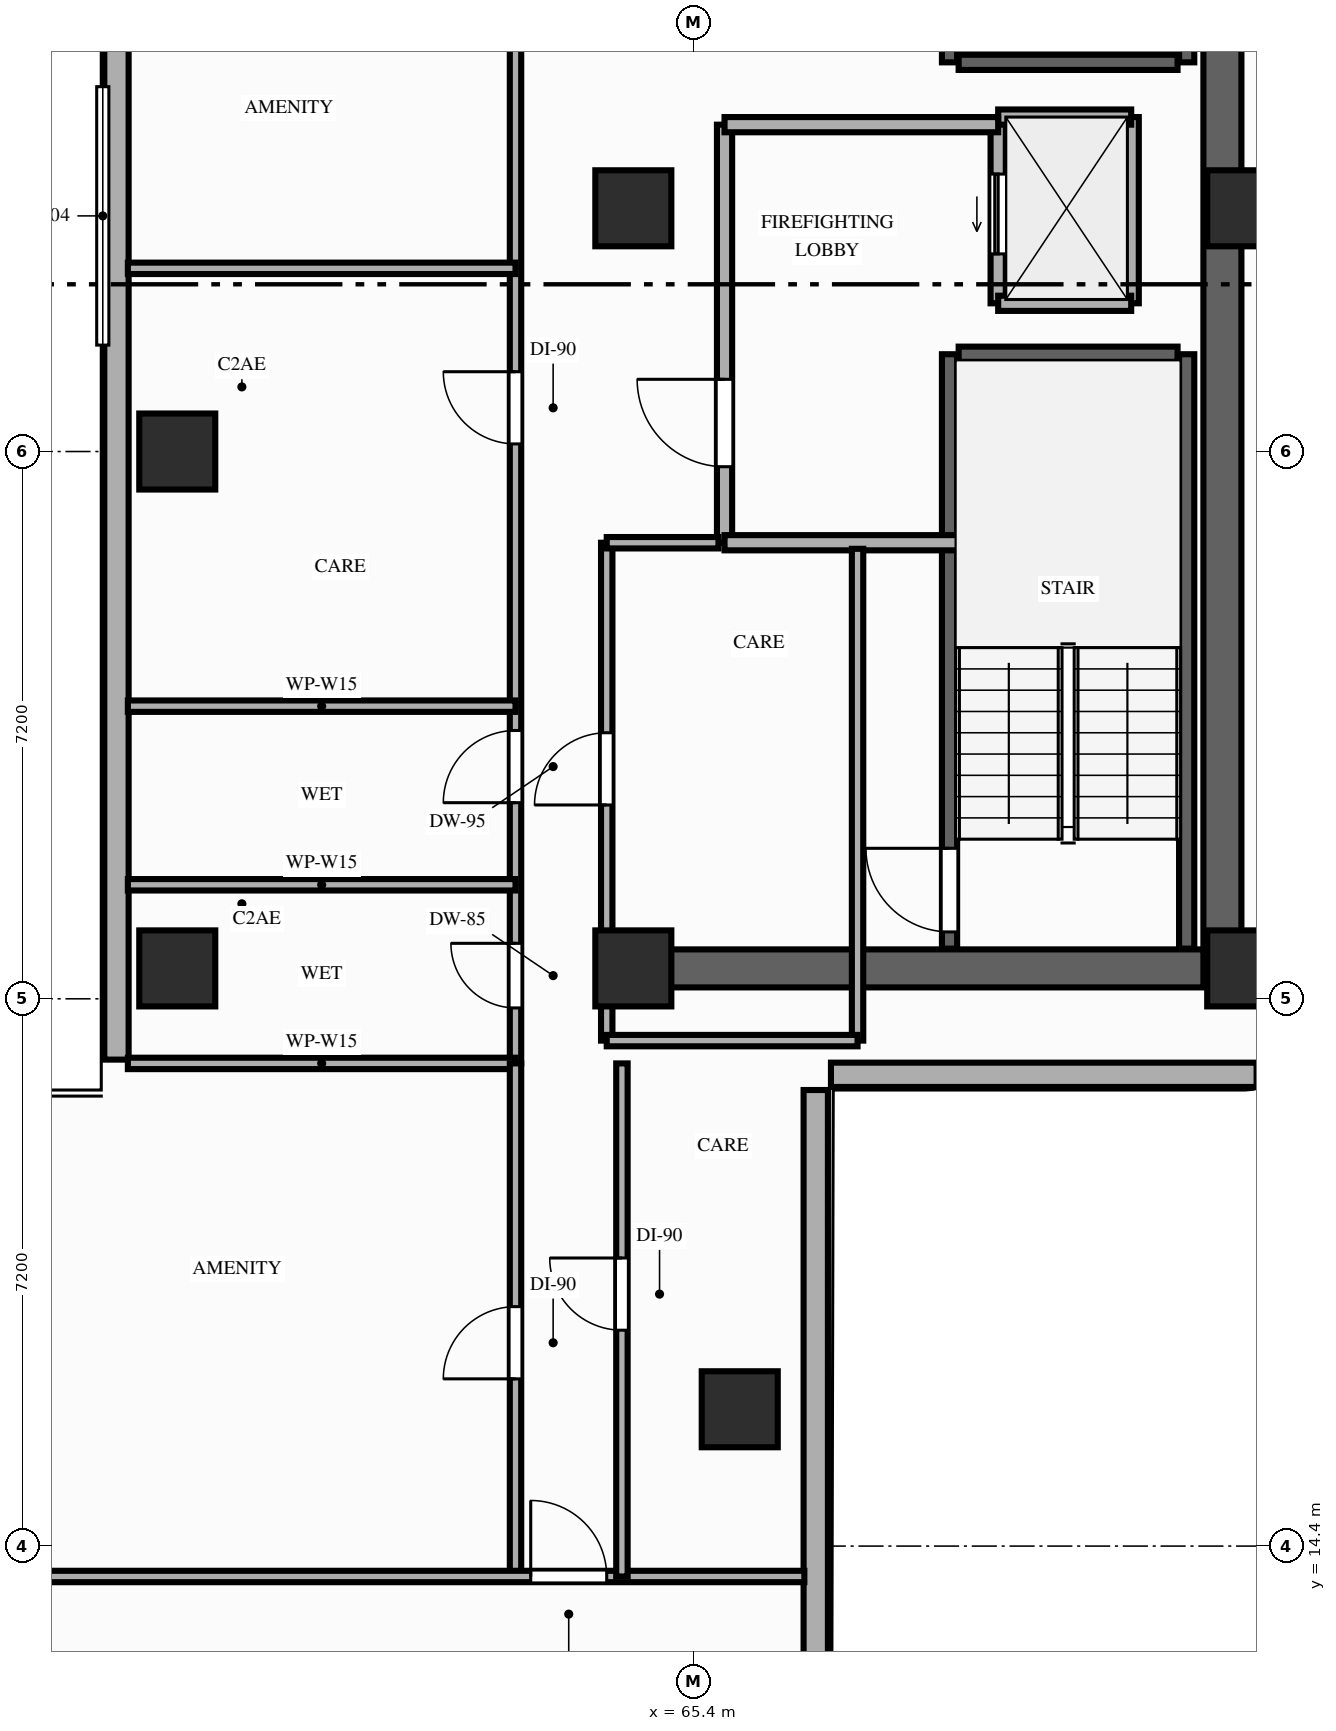
"""IFC4 building model, lengths in metres.
Left out: names, types, materials, properties, quantities, classifications, styles, units other than length and angle.
Written with IfcOpenShell. Run it as: python <this file> out.ifc"""

import sys

from ifc_helpers import new_model, si_unit, direction, frame, frame_2d, origin, origin_2d, place, context, subcontext, project, spatial, rectangle, extrude, element, fill, save


model = new_model("IFC4")
c1 = context("Model", 3, precision=1e-05, world=origin(), true_north=direction((0.0, 1.0)))
c2 = subcontext(c1, "Body", "Model", "MODEL_VIEW")
j1 = project(units=[si_unit("LENGTHUNIT", "METRE"), si_unit("PLANEANGLEUNIT", "RADIAN")], contexts=[c1])
p1 = place(None, origin())
s1 = spatial("IfcSite", under=j1, at=p1, CompositionType="ELEMENT")
p2 = place(p1, origin())
s2 = spatial("IfcBuilding", under=s1, at=p2, CompositionType="ELEMENT")
p3 = place(p2, frame((0.0, 0.0, 33.4)))
s3 = spatial("IfcBuildingStorey", under=s2, at=p3, CompositionType="ELEMENT", Elevation=33.4)
for number, where, z_axis, x_axis in (
    (1, (64.6, 22.0, 0.0), (0.0, 0.0, 1.0), (1.0, 0.0, 0.0)),
    (2, (72.65, 22.0, 0.0), (0.0, 0.0, 1.0), (1.0, 0.0, 0.0)),
    (3, (64.6, 32.0, 0.0), (0.0, 0.0, 1.0), (1.0, 0.0, 0.0)),
    (4, (72.65, 32.0, 0.0), (0.0, 0.0, 1.0), (1.0, 0.0, 0.0)),
    (5, (58.6, 22.0, 0.0), (0.0, 0.0, 1.0), (1.0, 0.0, 0.0)),
    (6, (58.6, 28.8, 0.0), (0.0, 0.0, 1.0), (1.0, 0.0, 0.0)),
    (7, (66.0, 16.2, 0.0), (0.0, 0.0, 1.0), (1.0, 0.0, 0.0)),
):
    element("IfcColumn", number, at=place(p3, frame(where, z_axis=z_axis, x_axis=x_axis)), inside=s3, PredefinedType="COLUMN", context=c2, shape_type="SweptSolid", body=[
        extrude(rectangle(XDim=1.0, YDim=1.0, at=origin_2d()), origin(), (0.0, 0.0, 1.0), 3.2),
    ])
p4 = place(p3, frame((57.8, 43.4, 0.0), z_axis=(0.0, 0.0, 1.0), x_axis=(0.0, -1.0, 0.0)))
e8 = element("IfcWall", 8, at=p4, inside=s3, PredefinedType="STANDARD", context=c2, shape_type="SweptSolid", body=[
    extrude(rectangle(XDim=22.6, YDim=0.32, at=frame_2d((11.3, 0.0))), origin(), (0.0, 0.0, 1.0), 2.51),
])
p5 = place(p3, frame((67.0, 7.6, 0.0), z_axis=(0.0, 0.0, 1.0), x_axis=(0.0, 1.0, 0.0)))
e9 = element("IfcWall", 9, at=p5, inside=s3, PredefinedType="STANDARD", context=c2, shape_type="SweptSolid", body=[
    extrude(rectangle(XDim=12.8, YDim=0.32, at=frame_2d((6.4, 0.0))), origin(), (0.0, 0.0, 1.0), 3.02),
])
p6 = place(p3, frame((67.2, 20.6, 0.0), z_axis=(0.0, 0.0, 1.0), x_axis=(1.0, 0.0, 0.0)))
e10 = element("IfcWall", 10, at=p6, inside=s3, PredefinedType="STANDARD", context=c2, shape_type="SweptSolid", body=[
    extrude(rectangle(XDim=5.6, YDim=0.32, at=frame_2d((2.8, 0.0))), origin(), (0.0, 0.0, 1.0), 3.02),
])
p7 = place(p3, frame((72.35, 22.0, 0.0), z_axis=(0.0, 0.0, 1.0), x_axis=(0.0, 1.0, 0.0)))
e11 = element("IfcWall", 11, at=p7, inside=s3, PredefinedType="SHEAR", context=c2, shape_type="SweptSolid", body=[
    extrude(rectangle(XDim=20.25, YDim=0.5, at=frame_2d((10.125, 0.0))), origin(), (0.0, 0.0, 1.0), 3.02),
])
p8 = place(p3, frame((64.6, 22.0, 0.0), z_axis=(0.0, 0.0, 1.0), x_axis=(1.0, 0.0, 0.0)))
e12 = element("IfcWall", 12, at=p8, inside=s3, PredefinedType="SHEAR", context=c2, shape_type="SweptSolid", body=[
    extrude(rectangle(XDim=7.5, YDim=0.5, at=frame_2d((3.75, 0.0))), origin(), (0.0, 0.0, 1.0), 3.02),
])
p9 = place(p3, frame((68.76, 22.26, 0.0), z_axis=(0.0, 0.0, 1.0), x_axis=(0.0, 1.0, 0.0)))
e13 = element("IfcWall", 13, at=p9, inside=s3, PredefinedType="SHEAR", context=c2, shape_type="SweptSolid", body=[
    extrude(rectangle(XDim=7.82, YDim=0.2, at=frame_2d((3.91, 0.0))), origin(), (0.0, 0.0, 1.0), 3.02),
])
p10 = place(p9, frame((0.22, 0.0, 0.0)))
e14 = element("IfcOpeningElement", 14, at=p10, cuts=e13, PredefinedType="OPENING", context=c2, shape_type="SweptSolid", body=[
    extrude(rectangle(XDim=1.1, YDim=2.15, at=frame_2d((0.55, 1.075))), frame((0.0, 0.11, 0.0), z_axis=(0.0, -1.0, 0.0), x_axis=(1.0, 0.0, 0.0)), (0.0, 0.0, 1.0), 0.22),
])
p11 = place(p3, frame((71.88, 22.26, 0.0), z_axis=(0.0, 0.0, 1.0), x_axis=(0.0, 1.0, 0.0)))
e15 = element("IfcWall", 15, at=p11, inside=s3, PredefinedType="SHEAR", context=c2, shape_type="SweptSolid", body=[
    extrude(rectangle(XDim=7.82, YDim=0.2, at=frame_2d((3.91, 0.0))), origin(), (0.0, 0.0, 1.0), 3.02),
])
p12 = place(p3, frame((68.88, 30.08, 0.0), z_axis=(0.0, 0.0, 1.0), x_axis=(1.0, 0.0, 0.0)))
e16 = element("IfcWall", 16, at=p12, inside=s3, PredefinedType="SHEAR", context=c2, shape_type="SweptSolid", body=[
    extrude(rectangle(XDim=2.88, YDim=0.2, at=frame_2d((1.44, 0.0))), origin(), (0.0, 0.0, 1.0), 3.02),
])
p13 = place(p3, frame((68.76, 33.92, 0.0), z_axis=(0.0, 0.0, 1.0), x_axis=(0.0, 1.0, 0.0)))
e17 = element("IfcWall", 17, at=p13, inside=s3, PredefinedType="SHEAR", context=c2, shape_type="SweptSolid", body=[
    extrude(rectangle(XDim=7.96, YDim=0.2, at=frame_2d((3.98, 0.0))), origin(), (0.0, 0.0, 1.0), 3.02),
])
p14 = place(p13, frame((0.22, 0.0, 0.0)))
e18 = element("IfcOpeningElement", 18, at=p14, cuts=e17, PredefinedType="OPENING", context=c2, shape_type="SweptSolid", body=[
    extrude(rectangle(XDim=1.1, YDim=2.15, at=frame_2d((0.55, 1.075))), frame((0.0, 0.11, 0.0), z_axis=(0.0, -1.0, 0.0), x_axis=(1.0, 0.0, 0.0)), (0.0, 0.0, 1.0), 0.22),
])
p15 = place(p3, frame((71.88, 33.92, 0.0), z_axis=(0.0, 0.0, 1.0), x_axis=(0.0, 1.0, 0.0)))
e19 = element("IfcWall", 19, at=p15, inside=s3, PredefinedType="SHEAR", context=c2, shape_type="SweptSolid", body=[
    extrude(rectangle(XDim=7.96, YDim=0.2, at=frame_2d((3.98, 0.0))), origin(), (0.0, 0.0, 1.0), 3.02),
])
p16 = place(p3, frame((68.88, 33.92, 0.0), z_axis=(0.0, 0.0, 1.0), x_axis=(1.0, 0.0, 0.0)))
e20 = element("IfcWall", 20, at=p16, inside=s3, PredefinedType="SHEAR", context=c2, shape_type="SweptSolid", body=[
    extrude(rectangle(XDim=2.88, YDim=0.2, at=frame_2d((1.44, 0.0))), origin(), (0.0, 0.0, 1.0), 3.02),
])
p17 = place(p3, frame((69.4, 30.75, 0.0), z_axis=(0.0, 0.0, 1.0), x_axis=(0.0, 1.0, 0.0)))
e21 = element("IfcWall", 21, at=p17, inside=s3, PredefinedType="MOVABLE", context=c2, shape_type="SweptSolid", body=[
    extrude(rectangle(XDim=2.45, YDim=0.2, at=frame_2d((1.225, 0.0))), origin(), (0.0, 0.0, 1.0), 3.02),
])
p18 = place(p17, frame((0.65, 0.0, 0.0)))
e22 = element("IfcOpeningElement", 22, at=p18, cuts=e21, PredefinedType="OPENING", context=c2, shape_type="SweptSolid", body=[
    extrude(rectangle(XDim=1.05, YDim=2.15, at=frame_2d((0.525, 1.075))), frame((0.0, 0.11, 0.0), z_axis=(0.0, -1.0, 0.0), x_axis=(1.0, 0.0, 0.0)), (0.0, 0.0, 1.0), 0.22),
])
p19 = place(p3, frame((71.15, 30.75, 0.0), z_axis=(0.0, 0.0, 1.0), x_axis=(0.0, 1.0, 0.0)))
e23 = element("IfcWall", 23, at=p19, inside=s3, PredefinedType="MOVABLE", context=c2, shape_type="SweptSolid", body=[
    extrude(rectangle(XDim=2.45, YDim=0.2, at=frame_2d((1.225, 0.0))), origin(), (0.0, 0.0, 1.0), 3.02),
])
for number, where, z_axis, x_axis in (
    (24, (69.4, 33.2, 0.0), (0.0, 0.0, 1.0), (1.0, 0.0, 0.0)),
    (25, (69.4, 30.75, 0.0), (0.0, 0.0, 1.0), (1.0, 0.0, 0.0)),
):
    element("IfcWall", number, at=place(p3, frame(where, z_axis=z_axis, x_axis=x_axis)), inside=s3, PredefinedType="MOVABLE", context=c2, shape_type="SweptSolid", body=[
        extrude(rectangle(XDim=1.75, YDim=0.2, at=frame_2d((0.875, 0.0))), origin(), (0.0, 0.0, 1.0), 3.02),
    ])
p20 = place(p3, frame((65.8, 27.6, 0.0), z_axis=(0.0, 0.0, 1.0), x_axis=(0.0, 1.0, 0.0)))
e26 = element("IfcWall", 26, at=p20, inside=s3, PredefinedType="PARTITIONING", context=c2, shape_type="SweptSolid", body=[
    extrude(rectangle(XDim=5.5, YDim=0.2, at=frame_2d((2.75, 0.0))), origin(), (0.0, 0.0, 1.0), 3.02),
])
p21 = place(p20, frame((1.0, 0.0, 0.0)))
e27 = element("IfcOpeningElement", 27, at=p21, cuts=e26, PredefinedType="OPENING", context=c2, shape_type="SweptSolid", body=[
    extrude(rectangle(XDim=1.15, YDim=2.15, at=frame_2d((0.575, 1.075))), frame((0.0, 0.11, 0.0), z_axis=(0.0, -1.0, 0.0), x_axis=(1.0, 0.0, 0.0)), (0.0, 0.0, 1.0), 0.22),
])
p22 = place(p3, frame((65.8, 33.1, 0.0), z_axis=(0.0, 0.0, 1.0), x_axis=(1.0, 0.0, 0.0)))
e28 = element("IfcWall", 28, at=p22, inside=s3, PredefinedType="PARTITIONING", context=c2, shape_type="SweptSolid", body=[
    extrude(rectangle(XDim=3.6, YDim=0.2, at=frame_2d((1.8, 0.0))), origin(), (0.0, 0.0, 1.0), 3.02),
])
p23 = place(p3, frame((65.8, 27.6, 0.0), z_axis=(0.0, 0.0, 1.0), x_axis=(1.0, 0.0, 0.0)))
e29 = element("IfcWall", 29, at=p23, inside=s3, PredefinedType="PARTITIONING", context=c2, shape_type="SweptSolid", body=[
    extrude(rectangle(XDim=3.4, YDim=0.2, at=frame_2d((1.7, 0.0))), origin(), (0.0, 0.0, 1.0), 3.02),
])
p24 = place(p3, frame((64.25, 21.05, 0.0), z_axis=(0.0, 0.0, 1.0), x_axis=(0.0, 1.0, 0.0)))
e30 = element("IfcWall", 30, at=p24, inside=s3, PredefinedType="PARTITIONING", context=c2, shape_type="SweptSolid", body=[
    extrude(rectangle(XDim=6.55, YDim=0.15, at=frame_2d((3.275, 0.0))), origin(), (0.0, 0.0, 1.0), 2.51),
])
p25 = place(p24, frame((3.1, 0.0, 0.0)))
e31 = element("IfcOpeningElement", 31, at=p25, cuts=e30, PredefinedType="OPENING", context=c2, shape_type="SweptSolid", body=[
    extrude(rectangle(XDim=0.95, YDim=2.15, at=frame_2d((0.475, 1.075))), frame((0.0, 0.085, 0.0), z_axis=(0.0, -1.0, 0.0), x_axis=(1.0, 0.0, 0.0)), (0.0, 0.0, 1.0), 0.17),
])
p26 = place(p3, frame((67.55, 21.05, 0.0), z_axis=(0.0, 0.0, 1.0), x_axis=(0.0, 1.0, 0.0)))
e32 = element("IfcWall", 32, at=p26, inside=s3, PredefinedType="PARTITIONING", context=c2, shape_type="SweptSolid", body=[
    extrude(rectangle(XDim=6.47, YDim=0.15, at=frame_2d((3.235, 0.0))), origin(), (0.0, 0.0, 1.0), 2.51),
])
p27 = place(p3, frame((64.25, 21.05, 0.0), z_axis=(0.0, 0.0, 1.0), x_axis=(1.0, 0.0, 0.0)))
e33 = element("IfcWall", 33, at=p27, inside=s3, PredefinedType="PARTITIONING", context=c2, shape_type="SweptSolid", body=[
    extrude(rectangle(XDim=3.3, YDim=0.15, at=frame_2d((1.65, 0.0))), origin(), (0.0, 0.0, 1.0), 2.51),
])
p28 = place(p3, frame((64.25, 27.6, 0.0), z_axis=(0.0, 0.0, 1.0), x_axis=(1.0, 0.0, 0.0)))
e34 = element("IfcWall", 34, at=p28, inside=s3, PredefinedType="PARTITIONING", context=c2, shape_type="SweptSolid", body=[
    extrude(rectangle(XDim=1.47, YDim=0.15, at=frame_2d((0.735, 0.0))), origin(), (0.0, 0.0, 1.0), 2.51),
])
p29 = place(p3, frame((63.05, 20.75, 0.0), z_axis=(0.0, 0.0, 1.0), x_axis=(0.0, 1.0, 0.0)))
e35 = element("IfcWall", 35, at=p29, inside=s3, PredefinedType="PARTITIONING", context=c2, shape_type="SweptSolid", body=[
    extrude(rectangle(XDim=22.7, YDim=0.15, at=frame_2d((11.35, 0.0))), origin(), (0.0, 0.0, 1.0), 2.51),
])
p30 = place(p29, frame((0.73, 0.0, 0.0)))
e36 = element("IfcOpeningElement", 36, at=p30, cuts=e35, PredefinedType="OPENING", context=c2, shape_type="SweptSolid", body=[
    extrude(rectangle(XDim=0.85, YDim=2.1, at=frame_2d((0.425, 1.05))), frame((0.0, 0.085, 0.0), z_axis=(0.0, -1.0, 0.0), x_axis=(1.0, 0.0, 0.0)), (0.0, 0.0, 1.0), 0.17),
])
p31 = place(p29, frame((3.43, 0.0, 0.0)))
e37 = element("IfcOpeningElement", 37, at=p31, cuts=e35, PredefinedType="OPENING", context=c2, shape_type="SweptSolid", body=[
    extrude(rectangle(XDim=0.95, YDim=2.1, at=frame_2d((0.475, 1.05))), frame((0.0, 0.085, 0.0), z_axis=(0.0, -1.0, 0.0), x_axis=(1.0, 0.0, 0.0)), (0.0, 0.0, 1.0), 0.17),
])
p32 = place(p29, frame((8.15, 0.0, 0.0)))
e38 = element("IfcOpeningElement", 38, at=p32, cuts=e35, PredefinedType="OPENING", context=c2, shape_type="SweptSolid", body=[
    extrude(rectangle(XDim=0.95, YDim=2.15, at=frame_2d((0.475, 1.075))), frame((0.0, 0.085, 0.0), z_axis=(0.0, -1.0, 0.0), x_axis=(1.0, 0.0, 0.0)), (0.0, 0.0, 1.0), 0.17),
])
p33 = place(p29, frame((13.67, 0.0, 0.0)))
e39 = element("IfcOpeningElement", 39, at=p33, cuts=e35, PredefinedType="OPENING", context=c2, shape_type="SweptSolid", body=[
    extrude(rectangle(XDim=0.95, YDim=2.15, at=frame_2d((0.475, 1.075))), frame((0.0, 0.085, 0.0), z_axis=(0.0, -1.0, 0.0), x_axis=(1.0, 0.0, 0.0)), (0.0, 0.0, 1.0), 0.17),
])
p34 = place(p29, frame((19.47, 0.0, 0.0)))
e40 = element("IfcOpeningElement", 40, at=p34, cuts=e35, PredefinedType="OPENING", context=c2, shape_type="SweptSolid", body=[
    extrude(rectangle(XDim=0.95, YDim=2.15, at=frame_2d((0.475, 1.075))), frame((0.0, 0.085, 0.0), z_axis=(0.0, -1.0, 0.0), x_axis=(1.0, 0.0, 0.0)), (0.0, 0.0, 1.0), 0.17),
])
for number, where, z_axis, x_axis in (
    (41, (57.95, 20.75, 0.0), (0.0, 0.0, 1.0), (1.0, 0.0, 0.0)),
    (42, (57.95, 23.1, 0.0), (0.0, 0.0, 1.0), (1.0, 0.0, 0.0)),
    (43, (57.95, 25.45, 0.0), (0.0, 0.0, 1.0), (1.0, 0.0, 0.0)),
    (44, (57.95, 31.21, 0.0), (0.0, 0.0, 1.0), (1.0, 0.0, 0.0)),
):
    element("IfcWall", number, at=place(p3, frame(where, z_axis=z_axis, x_axis=x_axis)), inside=s3, PredefinedType="PARTITIONING", context=c2, shape_type="SweptSolid", body=[
        extrude(rectangle(XDim=5.1, YDim=0.15, at=frame_2d((2.55, 0.0))), origin(), (0.0, 0.0, 1.0), 2.51),
    ])
p35 = place(p3, frame((63.05, 14.0, 0.0), z_axis=(0.0, 0.0, 1.0), x_axis=(0.0, 1.0, 0.0)))
e45 = element("IfcWall", 45, at=p35, inside=s3, PredefinedType="PARTITIONING", context=c2, shape_type="SweptSolid", body=[
    extrude(rectangle(XDim=6.75, YDim=0.15, at=frame_2d((3.375, 0.0))), origin(), (0.0, 0.0, 1.0), 2.51),
])
p36 = place(p35, frame((2.6, 0.0, 0.0)))
e46 = element("IfcOpeningElement", 46, at=p36, cuts=e45, PredefinedType="OPENING", context=c2, shape_type="SweptSolid", body=[
    extrude(rectangle(XDim=0.95, YDim=2.15, at=frame_2d((0.475, 1.075))), frame((0.0, 0.085, 0.0), z_axis=(0.0, -1.0, 0.0), x_axis=(1.0, 0.0, 0.0)), (0.0, 0.0, 1.0), 0.17),
])
p37 = place(p3, frame((55.55, 14.0, 0.0), z_axis=(0.0, 0.0, 1.0), x_axis=(1.0, 0.0, 0.0)))
e47 = element("IfcWall", 47, at=p37, inside=s3, PredefinedType="PARTITIONING", context=c2, shape_type="SweptSolid", body=[
    extrude(rectangle(XDim=11.3, YDim=0.15, at=frame_2d((5.65, 0.0))), origin(), (0.0, 0.0, 1.0), 2.51),
])
p38 = place(p37, frame((7.7, 0.0, 0.0)))
e48 = element("IfcOpeningElement", 48, at=p38, cuts=e47, PredefinedType="OPENING", context=c2, shape_type="SweptSolid", body=[
    extrude(rectangle(XDim=1.0, YDim=2.15, at=frame_2d((0.5, 1.075))), frame((0.0, 0.085, 0.0), z_axis=(0.0, -1.0, 0.0), x_axis=(1.0, 0.0, 0.0)), (0.0, 0.0, 1.0), 0.17),
])
p39 = place(p3, frame((64.45, 14.0, 0.0), z_axis=(0.0, 0.0, 1.0), x_axis=(0.0, 1.0, 0.0)))
e49 = element("IfcWall", 49, at=p39, inside=s3, PredefinedType="PARTITIONING", context=c2, shape_type="SweptSolid", body=[
    extrude(rectangle(XDim=6.75, YDim=0.15, at=frame_2d((3.375, 0.0))), origin(), (0.0, 0.0, 1.0), 2.51),
])
p40 = place(p39, frame((3.24, 0.0, 0.0)))
e50 = element("IfcOpeningElement", 50, at=p40, cuts=e49, PredefinedType="OPENING", context=c2, shape_type="SweptSolid", body=[
    extrude(rectangle(XDim=0.95, YDim=2.15, at=frame_2d((0.475, 1.075))), frame((0.0, 0.085, 0.0), z_axis=(0.0, -1.0, 0.0), x_axis=(1.0, 0.0, 0.0)), (0.0, 0.0, 1.0), 0.17),
])
p41 = place(p10, origin())
e51 = element("IfcDoor", 51, at=p41, inside=s3, OperationType="SINGLE_SWING_RIGHT", PredefinedType="DOOR", context=c2, shape_type="SweptSolid", body=[
    extrude(rectangle(XDim=1.1, YDim=2.15, at=frame_2d((0.55, 1.075))), frame((0.0, 0.025, 0.0), z_axis=(0.0, -1.0, 0.0), x_axis=(1.0, 0.0, 0.0)), (0.0, 0.0, 1.0), 0.05),
])
fill(e14, e51)
p42 = place(p18, origin())
e52 = element("IfcDoor", 52, at=p42, inside=s3, OperationType="SLIDING_TO_LEFT", PredefinedType="DOOR", context=c2, shape_type="SweptSolid", body=[
    extrude(rectangle(XDim=1.05, YDim=2.15, at=frame_2d((0.525, 1.075))), frame((0.0, 0.025, 0.0), z_axis=(0.0, -1.0, 0.0), x_axis=(1.0, 0.0, 0.0)), (0.0, 0.0, 1.0), 0.05),
])
fill(e22, e52)
p43 = place(p21, origin())
e53 = element("IfcDoor", 53, at=p43, inside=s3, OperationType="SINGLE_SWING_RIGHT", PredefinedType="DOOR", context=c2, shape_type="SweptSolid", body=[
    extrude(rectangle(XDim=1.15, YDim=2.15, at=frame_2d((0.575, 1.075))), frame((0.0, 0.025, 0.0), z_axis=(0.0, -1.0, 0.0), x_axis=(1.0, 0.0, 0.0)), (0.0, 0.0, 1.0), 0.05),
])
fill(e27, e53)
p44 = place(p25, origin())
e54 = element("IfcDoor", 54, at=p44, inside=s3, OperationType="SINGLE_SWING_LEFT", PredefinedType="DOOR", context=c2, shape_type="SweptSolid", body=[
    extrude(rectangle(XDim=0.95, YDim=2.15, at=frame_2d((0.475, 1.075))), frame((0.0, 0.025, 0.0), z_axis=(0.0, -1.0, 0.0), x_axis=(1.0, 0.0, 0.0)), (0.0, 0.0, 1.0), 0.05),
])
fill(e31, e54)
p45 = place(p30, origin())
e55 = element("IfcDoor", 55, at=p45, inside=s3, OperationType="SINGLE_SWING_RIGHT", PredefinedType="DOOR", context=c2, shape_type="SweptSolid", body=[
    extrude(rectangle(XDim=0.85, YDim=2.1, at=frame_2d((0.425, 1.05))), frame((0.0, 0.025, 0.0), z_axis=(0.0, -1.0, 0.0), x_axis=(1.0, 0.0, 0.0)), (0.0, 0.0, 1.0), 0.05),
])
fill(e36, e55)
p46 = place(p31, origin())
e56 = element("IfcDoor", 56, at=p46, inside=s3, OperationType="SINGLE_SWING_LEFT", PredefinedType="DOOR", context=c2, shape_type="SweptSolid", body=[
    extrude(rectangle(XDim=0.95, YDim=2.1, at=frame_2d((0.475, 1.05))), frame((0.0, 0.025, 0.0), z_axis=(0.0, -1.0, 0.0), x_axis=(1.0, 0.0, 0.0)), (0.0, 0.0, 1.0), 0.05),
])
fill(e37, e56)
p47 = place(p32, origin())
e57 = element("IfcDoor", 57, at=p47, inside=s3, OperationType="SINGLE_SWING_RIGHT", PredefinedType="DOOR", context=c2, shape_type="SweptSolid", body=[
    extrude(rectangle(XDim=0.95, YDim=2.15, at=frame_2d((0.475, 1.075))), frame((0.0, 0.025, 0.0), z_axis=(0.0, -1.0, 0.0), x_axis=(1.0, 0.0, 0.0)), (0.0, 0.0, 1.0), 0.05),
])
fill(e38, e57)
p48 = place(p36, origin())
e58 = element("IfcDoor", 58, at=p48, inside=s3, OperationType="SINGLE_SWING_LEFT", PredefinedType="DOOR", context=c2, shape_type="SweptSolid", body=[
    extrude(rectangle(XDim=0.95, YDim=2.15, at=frame_2d((0.475, 1.075))), frame((0.0, 0.025, 0.0), z_axis=(0.0, -1.0, 0.0), x_axis=(1.0, 0.0, 0.0)), (0.0, 0.0, 1.0), 0.05),
])
fill(e46, e58)
p49 = place(p40, origin())
e59 = element("IfcDoor", 59, at=p49, inside=s3, OperationType="SINGLE_SWING_RIGHT", PredefinedType="DOOR", context=c2, shape_type="SweptSolid", body=[
    extrude(rectangle(XDim=0.95, YDim=2.15, at=frame_2d((0.475, 1.075))), frame((0.0, 0.025, 0.0), z_axis=(0.0, -1.0, 0.0), x_axis=(1.0, 0.0, 0.0)), (0.0, 0.0, 1.0), 0.05),
])
fill(e50, e59)
p50 = place(p38, origin())
e60 = element("IfcDoor", 60, at=p50, inside=s3, OperationType="SINGLE_SWING_LEFT", PredefinedType="DOOR", context=c2, shape_type="SweptSolid", body=[
    extrude(rectangle(XDim=1.0, YDim=2.15, at=frame_2d((0.5, 1.075))), frame((0.0, 0.025, 0.0), z_axis=(0.0, -1.0, 0.0), x_axis=(1.0, 0.0, 0.0)), (0.0, 0.0, 1.0), 0.05),
])
fill(e48, e60)
save(model, sys.argv[1])
